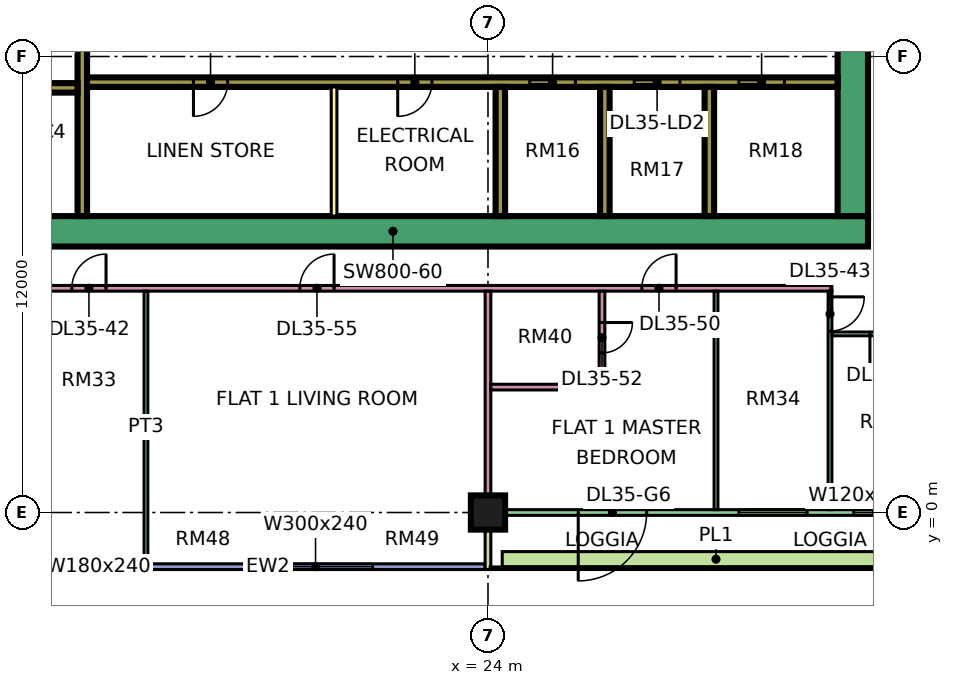
"""IFC4 building model, lengths in metres.
Left out: names, types, materials, properties, quantities, classifications, styles, units other than length and angle.
Written with IfcOpenShell. Run it as: python <this file> out.ifc"""

import sys

from ifc_helpers import new_model, si_unit, direction, frame, frame_2d, origin, origin_2d, place, context, subcontext, project, spatial, rectangle, extrude, element, fill, save


model = new_model("IFC4")
c1 = context("Model", 3, precision=1e-05, world=origin(), true_north=direction((0.0, 1.0)))
c2 = subcontext(c1, "Body", "Model", "MODEL_VIEW")
j1 = project(units=[si_unit("LENGTHUNIT", "METRE"), si_unit("PLANEANGLEUNIT", "RADIAN")], contexts=[c1])
p1 = place(None, origin())
s1 = spatial("IfcSite", under=j1, at=p1, CompositionType="ELEMENT")
p2 = place(p1, origin())
s2 = spatial("IfcBuilding", under=s1, at=p2, CompositionType="ELEMENT")
p3 = place(p2, frame((0.0, 0.0, 157.4)))
s3 = spatial("IfcBuildingStorey", under=s2, at=p3, CompositionType="ELEMENT", Elevation=157.4)
p4 = place(p3, frame((24.0, 0.0, 0.0), z_axis=(0.0, 0.0, 1.0), x_axis=(1.0, 0.0, 0.0)))
e1 = element("IfcColumn", 1, at=p4, inside=s3, PredefinedType="COLUMN", context=c2, shape_type="SweptSolid", body=[
    extrude(rectangle(XDim=0.9, YDim=0.9, at=origin_2d()), origin(), (0.0, 0.0, 1.0), 3.75),
])
p5 = place(p3, frame((9.0, 7.4, 0.0), z_axis=(0.0, 0.0, 1.0), x_axis=(1.0, 0.0, 0.0)))
e2 = element("IfcWall", 2, at=p5, inside=s3, PredefinedType="SHEAR", context=c2, shape_type="SweptSolid", body=[
    extrude(rectangle(XDim=25.0, YDim=0.8, at=frame_2d((12.5, 0.0))), origin(), (0.0, 0.0, 1.0), 3.75),
])
p6 = place(p3, frame((33.6, 7.8, 0.0), z_axis=(0.0, 0.0, 1.0), x_axis=(0.0, 1.0, 0.0)))
e3 = element("IfcWall", 3, at=p6, inside=s3, PredefinedType="SHEAR", context=c2, shape_type="SweptSolid", body=[
    extrude(rectangle(XDim=11.4, YDim=0.8, at=frame_2d((5.7, 0.0))), origin(), (0.0, 0.0, 1.0), 3.75),
])
p7 = place(p6, frame((5.4, 0.0, 0.0)))
e4 = element("IfcOpeningElement", 4, at=p7, cuts=e3, PredefinedType="OPENING", context=c2, shape_type="SweptSolid", body=[
    extrude(rectangle(XDim=1.8, YDim=2.4, at=frame_2d((0.9, 1.2))), frame((0.0, 0.41, 0.0), z_axis=(0.0, -1.0, 0.0), x_axis=(1.0, 0.0, 0.0)), (0.0, 0.0, 1.0), 0.82),
])
p8 = place(p3, frame((13.325, 7.8, 0.0), z_axis=(0.0, 0.0, 1.0), x_axis=(0.0, 1.0, 0.0)))
e5 = element("IfcWall", 5, at=p8, inside=s3, PredefinedType="SHEAR", context=c2, shape_type="SweptSolid", body=[
    extrude(rectangle(XDim=11.4, YDim=0.25, at=frame_2d((5.7, 0.0))), origin(), (0.0, 0.0, 1.0), 3.75),
])
p9 = place(p3, frame((13.45, 11.325, 0.0), z_axis=(0.0, 0.0, 1.0), x_axis=(1.0, 0.0, 0.0)))
e6 = element("IfcWall", 6, at=p9, inside=s3, PredefinedType="SHEAR", context=c2, shape_type="SweptSolid", body=[
    extrude(rectangle(XDim=19.75, YDim=0.25, at=frame_2d((9.875, 0.0))), origin(), (0.0, 0.0, 1.0), 3.75),
])
p10 = place(p9, frame((11.65, 0.0, 0.0)))
e7 = element("IfcOpeningElement", 7, at=p10, cuts=e6, PredefinedType="OPENING", context=c2, shape_type="SweptSolid", body=[
    extrude(rectangle(XDim=1.2, YDim=2.2, at=frame_2d((0.6, 1.1))), frame((0.0, 0.135, 0.0), z_axis=(0.0, -1.0, 0.0), x_axis=(1.0, 0.0, 0.0)), (0.0, 0.0, 1.0), 0.27),
])
p11 = place(p9, frame((14.4, 0.0, 0.0)))
e8 = element("IfcOpeningElement", 8, at=p11, cuts=e6, PredefinedType="OPENING", context=c2, shape_type="SweptSolid", body=[
    extrude(rectangle(XDim=1.2, YDim=2.2, at=frame_2d((0.6, 1.1))), frame((0.0, 0.135, 0.0), z_axis=(0.0, -1.0, 0.0), x_axis=(1.0, 0.0, 0.0)), (0.0, 0.0, 1.0), 0.27),
])
p12 = place(p9, frame((17.15, 0.0, 0.0)))
e9 = element("IfcOpeningElement", 9, at=p12, cuts=e6, PredefinedType="OPENING", context=c2, shape_type="SweptSolid", body=[
    extrude(rectangle(XDim=1.2, YDim=2.2, at=frame_2d((0.6, 1.1))), frame((0.0, 0.135, 0.0), z_axis=(0.0, -1.0, 0.0), x_axis=(1.0, 0.0, 0.0)), (0.0, 0.0, 1.0), 0.27),
])
p13 = place(p9, frame((2.8, 0.0, 0.0)))
e10 = element("IfcOpeningElement", 10, at=p13, cuts=e6, PredefinedType="OPENING", context=c2, shape_type="SweptSolid", body=[
    extrude(rectangle(XDim=0.9, YDim=2.1, at=frame_2d((0.45, 1.05))), frame((0.0, 0.135, 0.0), z_axis=(0.0, -1.0, 0.0), x_axis=(1.0, 0.0, 0.0)), (0.0, 0.0, 1.0), 0.27),
])
p14 = place(p9, frame((8.175, 0.0, 0.0)))
e11 = element("IfcOpeningElement", 11, at=p14, cuts=e6, PredefinedType="OPENING", context=c2, shape_type="SweptSolid", body=[
    extrude(rectangle(XDim=0.9, YDim=2.1, at=frame_2d((0.45, 1.05))), frame((0.0, 0.135, 0.0), z_axis=(0.0, -1.0, 0.0), x_axis=(1.0, 0.0, 0.0)), (0.0, 0.0, 1.0), 0.27),
])
p15 = place(p3, frame((10.2, 11.175, 0.0), z_axis=(0.0, 0.0, 1.0), x_axis=(1.0, 0.0, 0.0)))
e12 = element("IfcWall", 12, at=p15, inside=s3, PredefinedType="SHEAR", context=c2, shape_type="SweptSolid", body=[
    extrude(rectangle(XDim=3.0, YDim=0.25, at=frame_2d((1.5, 0.0))), origin(), (0.0, 0.0, 1.0), 3.75),
])
for number, where, z_axis, x_axis in (
    (13, (24.325, 7.8, 0.0), (0.0, 0.0, 1.0), (0.0, 1.0, 0.0)),
    (14, (27.075, 7.8, 0.0), (0.0, 0.0, 1.0), (0.0, 1.0, 0.0)),
    (15, (29.825, 7.8, 0.0), (0.0, 0.0, 1.0), (0.0, 1.0, 0.0)),
):
    element("IfcWall", number, at=place(p3, frame(where, z_axis=z_axis, x_axis=x_axis)), inside=s3, PredefinedType="SHEAR", context=c2, shape_type="SweptSolid", body=[
        extrude(rectangle(XDim=3.4, YDim=0.25, at=frame_2d((1.7, 0.0))), origin(), (0.0, 0.0, 1.0), 3.75),
    ])
p16 = place(p3, frame((-1.447, 12.553, 0.0), z_axis=(0.0, 0.0, 1.0), x_axis=(0.707106781187, -0.707106781187, 0.0)))
e16 = element("IfcWall", 16, at=p16, inside=s3, PredefinedType="SOLIDWALL", context=c2, shape_type="SweptSolid", body=[
    extrude(rectangle(XDim=19.799, YDim=0.15, at=frame_2d((9.899, 0.0))), origin(), (0.0, 0.0, 1.0), 3.35),
])
p17 = place(p16, frame((2.212, 0.0, 0.45)))
e17 = element("IfcOpeningElement", 17, at=p17, cuts=e16, PredefinedType="OPENING", context=c2, shape_type="SweptSolid", body=[
    extrude(rectangle(XDim=3.0, YDim=2.4, at=frame_2d((1.5, 1.2))), frame((0.0, 0.085, 0.0), z_axis=(0.0, -1.0, 0.0), x_axis=(1.0, 0.0, 0.0)), (0.0, 0.0, 1.0), 0.17),
])
p18 = place(p16, frame((10.216, 0.0, 0.45)))
e18 = element("IfcOpeningElement", 18, at=p18, cuts=e16, PredefinedType="OPENING", context=c2, shape_type="SweptSolid", body=[
    extrude(rectangle(XDim=3.0, YDim=2.4, at=frame_2d((1.5, 1.2))), frame((0.0, 0.085, 0.0), z_axis=(0.0, -1.0, 0.0), x_axis=(1.0, 0.0, 0.0)), (0.0, 0.0, 1.0), 0.17),
])
p19 = place(p3, frame((12.5, -1.425, 0.0), z_axis=(0.0, 0.0, 1.0), x_axis=(1.0, 0.0, 0.0)))
e19 = element("IfcWall", 19, at=p19, inside=s3, PredefinedType="SOLIDWALL", context=c2, shape_type="SweptSolid", body=[
    extrude(rectangle(XDim=11.425, YDim=0.15, at=frame_2d((5.712, 0.0))), origin(), (0.0, 0.0, 1.0), 3.35),
])
p20 = place(p19, frame((0.35, 0.0, 0.45)))
e20 = element("IfcOpeningElement", 20, at=p20, cuts=e19, PredefinedType="OPENING", context=c2, shape_type="SweptSolid", body=[
    extrude(rectangle(XDim=1.8, YDim=2.4, at=frame_2d((0.9, 1.2))), frame((0.0, 0.085, 0.0), z_axis=(0.0, -1.0, 0.0), x_axis=(1.0, 0.0, 0.0)), (0.0, 0.0, 1.0), 0.17),
])
p21 = place(p19, frame((5.462, 0.0, 0.45)))
e21 = element("IfcOpeningElement", 21, at=p21, cuts=e19, PredefinedType="OPENING", context=c2, shape_type="SweptSolid", body=[
    extrude(rectangle(XDim=3.0, YDim=2.4, at=frame_2d((1.5, 1.2))), frame((0.0, 0.085, 0.0), z_axis=(0.0, -1.0, 0.0), x_axis=(1.0, 0.0, 0.0)), (0.0, 0.0, 1.0), 0.17),
])
p22 = place(p3, frame((24.075, 0.0, 0.0), z_axis=(0.0, 0.0, 1.0), x_axis=(1.0, 0.0, 0.0)))
e22 = element("IfcWall", 22, at=p22, inside=s3, PredefinedType="SOLIDWALL", context=c2, shape_type="SweptSolid", body=[
    extrude(rectangle(XDim=11.85, YDim=0.15, at=frame_2d((5.925, 0.0))), origin(), (0.0, 0.0, 1.0), 3.35),
])
p23 = place(p22, frame((2.3, 0.0, 0.0)))
e23 = element("IfcOpeningElement", 23, at=p23, cuts=e22, PredefinedType="OPENING", context=c2, shape_type="SweptSolid", body=[
    extrude(rectangle(XDim=1.8, YDim=2.4, at=frame_2d((0.9, 1.2))), frame((0.0, 0.085, 0.0), z_axis=(0.0, -1.0, 0.0), x_axis=(1.0, 0.0, 0.0)), (0.0, 0.0, 1.0), 0.17),
])
p24 = place(p22, frame((6.525, 0.0, 0.45)))
e24 = element("IfcOpeningElement", 24, at=p24, cuts=e22, PredefinedType="OPENING", context=c2, shape_type="SweptSolid", body=[
    extrude(rectangle(XDim=1.8, YDim=2.4, at=frame_2d((0.9, 1.2))), frame((0.0, 0.085, 0.0), z_axis=(0.0, -1.0, 0.0), x_axis=(1.0, 0.0, 0.0)), (0.0, 0.0, 1.0), 0.17),
])
p25 = place(p22, frame((9.55, 0.0, 0.45)))
e25 = element("IfcOpeningElement", 25, at=p25, cuts=e22, PredefinedType="OPENING", context=c2, shape_type="SweptSolid", body=[
    extrude(rectangle(XDim=1.2, YDim=2.4, at=frame_2d((0.6, 1.2))), frame((0.0, 0.085, 0.0), z_axis=(0.0, -1.0, 0.0), x_axis=(1.0, 0.0, 0.0)), (0.0, 0.0, 1.0), 0.17),
])
p26 = place(p3, frame((24.0, -1.5, 0.0), z_axis=(0.0, 0.0, 1.0), x_axis=(0.0, 1.0, 0.0)))
e26 = element("IfcWall", 26, at=p26, inside=s3, PredefinedType="SOLIDWALL", context=c2, shape_type="SweptSolid", body=[
    extrude(rectangle(XDim=1.5, YDim=0.15, at=frame_2d((0.75, 0.0))), origin(), (0.0, 0.0, 1.0), 3.35),
])
p27 = place(p3, frame((24.375, -1.229, 0.0), z_axis=(0.0, 0.0, 1.0), x_axis=(1.0, 0.0, 0.0)))
e27 = element("IfcWall", 27, at=p27, inside=s3, PredefinedType="SOLIDWALL", context=c2, shape_type="SweptSolid", body=[
    extrude(rectangle(XDim=11.25, YDim=0.4, at=frame_2d((5.625, 0.0))), origin(), (0.0, 0.0, 1.0), 0.7),
])
p28 = place(p3, frame((19.95, 7.8, 0.0), z_axis=(0.0, 0.0, 1.0), x_axis=(0.0, 1.0, 0.0)))
e28 = element("IfcWall", 28, at=p28, inside=s3, PredefinedType="PARTITIONING", context=c2, shape_type="SweptSolid", body=[
    extrude(rectangle(XDim=3.4, YDim=0.15, at=frame_2d((1.7, 0.0))), origin(), (0.0, 0.0, 1.0), 3.35),
])
p29 = place(p3, frame((11.95, 5.9, 0.0), z_axis=(0.0, 0.0, 1.0), x_axis=(1.0, 0.0, 0.0)))
e29 = element("IfcWall", 29, at=p29, inside=s3, PredefinedType="PARTITIONING", context=c2, shape_type="SweptSolid", body=[
    extrude(rectangle(XDim=21.1, YDim=0.15, at=frame_2d((10.55, 0.0))), origin(), (0.0, 0.0, 1.0), 3.35),
])
p30 = place(p29, frame((1.1, 0.0, 0.0)))
e30 = element("IfcOpeningElement", 30, at=p30, cuts=e29, PredefinedType="OPENING", context=c2, shape_type="SweptSolid", body=[
    extrude(rectangle(XDim=0.9, YDim=2.1, at=frame_2d((0.45, 1.05))), frame((0.0, 0.085, 0.0), z_axis=(0.0, -1.0, 0.0), x_axis=(1.0, 0.0, 0.0)), (0.0, 0.0, 1.0), 0.17),
])
p31 = place(p29, frame((16.1, 0.0, 0.0)))
e31 = element("IfcOpeningElement", 31, at=p31, cuts=e29, PredefinedType="OPENING", context=c2, shape_type="SweptSolid", body=[
    extrude(rectangle(XDim=0.9, YDim=2.1, at=frame_2d((0.45, 1.05))), frame((0.0, 0.085, 0.0), z_axis=(0.0, -1.0, 0.0), x_axis=(1.0, 0.0, 0.0)), (0.0, 0.0, 1.0), 0.17),
])
p32 = place(p29, frame((7.1, 0.0, 0.0)))
e32 = element("IfcOpeningElement", 32, at=p32, cuts=e29, PredefinedType="OPENING", context=c2, shape_type="SweptSolid", body=[
    extrude(rectangle(XDim=0.9, YDim=2.1, at=frame_2d((0.45, 1.05))), frame((0.0, 0.085, 0.0), z_axis=(0.0, -1.0, 0.0), x_axis=(1.0, 0.0, 0.0)), (0.0, 0.0, 1.0), 0.17),
])
p33 = place(p3, frame((15.0, -1.35, 0.0), z_axis=(0.0, 0.0, 1.0), x_axis=(0.0, 1.0, 0.0)))
e33 = element("IfcWall", 33, at=p33, inside=s3, PredefinedType="PARTITIONING", context=c2, shape_type="SweptSolid", body=[
    extrude(rectangle(XDim=7.175, YDim=0.1, at=frame_2d((3.587, 0.0))), origin(), (0.0, 0.0, 1.0), 3.35),
])
p34 = place(p3, frame((24.0, 0.0, 0.0), z_axis=(0.0, 0.0, 1.0), x_axis=(0.0, 1.0, 0.0)))
e34 = element("IfcWall", 34, at=p34, inside=s3, PredefinedType="PARTITIONING", context=c2, shape_type="SweptSolid", body=[
    extrude(rectangle(XDim=5.825, YDim=0.15, at=frame_2d((2.913, 0.0))), origin(), (0.0, 0.0, 1.0), 3.35),
])
p35 = place(p3, frame((24.075, 3.3, 0.0), z_axis=(0.0, 0.0, 1.0), x_axis=(1.0, 0.0, 0.0)))
e35 = element("IfcWall", 35, at=p35, inside=s3, PredefinedType="PARTITIONING", context=c2, shape_type="SweptSolid", body=[
    extrude(rectangle(XDim=3.0, YDim=0.15, at=frame_2d((1.5, 0.0))), origin(), (0.0, 0.0, 1.0), 3.35),
])
p36 = place(p3, frame((27.0, 3.375, 0.0), z_axis=(0.0, 0.0, 1.0), x_axis=(0.0, 1.0, 0.0)))
e36 = element("IfcWall", 36, at=p36, inside=s3, PredefinedType="PARTITIONING", context=c2, shape_type="SweptSolid", body=[
    extrude(rectangle(XDim=2.45, YDim=0.15, at=frame_2d((1.225, 0.0))), origin(), (0.0, 0.0, 1.0), 3.35),
])
p37 = place(p36, frame((0.825, 0.0, 0.0)))
e37 = element("IfcOpeningElement", 37, at=p37, cuts=e36, PredefinedType="OPENING", context=c2, shape_type="SweptSolid", body=[
    extrude(rectangle(XDim=0.8, YDim=2.1, at=frame_2d((0.4, 1.05))), frame((0.0, 0.085, 0.0), z_axis=(0.0, -1.0, 0.0), x_axis=(1.0, 0.0, 0.0)), (0.0, 0.0, 1.0), 0.17),
])
p38 = place(p3, frame((30.0, 0.074, 0.0), z_axis=(0.0, 0.0, 1.0), x_axis=(0.0, 1.0, 0.0)))
e38 = element("IfcWall", 38, at=p38, inside=s3, PredefinedType="PARTITIONING", context=c2, shape_type="SweptSolid", body=[
    extrude(rectangle(XDim=5.751, YDim=0.1, at=frame_2d((2.875, 0.0))), origin(), (0.0, 0.0, 1.0), 3.35),
])
p39 = place(p3, frame((33.0, 0.074, 0.0), z_axis=(0.0, 0.0, 1.0), x_axis=(0.0, 1.0, 0.0)))
e39 = element("IfcWall", 39, at=p39, inside=s3, PredefinedType="PARTITIONING", context=c2, shape_type="SweptSolid", body=[
    extrude(rectangle(XDim=5.751, YDim=0.1, at=frame_2d((2.875, 0.0))), origin(), (0.0, 0.0, 1.0), 3.35),
])
p40 = place(p39, frame((4.701, 0.0, 0.0)))
e40 = element("IfcOpeningElement", 40, at=p40, cuts=e39, PredefinedType="OPENING", context=c2, shape_type="SweptSolid", body=[
    extrude(rectangle(XDim=0.9, YDim=2.1, at=frame_2d((0.45, 1.05))), frame((0.0, 0.06, 0.0), z_axis=(0.0, -1.0, 0.0), x_axis=(1.0, 0.0, 0.0)), (0.0, 0.0, 1.0), 0.12),
])
p41 = place(p3, frame((33.05, 4.7, 0.0), z_axis=(0.0, 0.0, 1.0), x_axis=(1.0, 0.0, 0.0)))
e41 = element("IfcWall", 41, at=p41, inside=s3, PredefinedType="PARTITIONING", context=c2, shape_type="SweptSolid", body=[
    extrude(rectangle(XDim=20.85, YDim=0.1, at=frame_2d((10.425, 0.0))), origin(), (0.0, 0.0, 1.0), 3.35),
])
p42 = place(p41, frame((1.0, 0.0, 0.0)))
e42 = element("IfcOpeningElement", 42, at=p42, cuts=e41, PredefinedType="OPENING", context=c2, shape_type="SweptSolid", body=[
    extrude(rectangle(XDim=0.9, YDim=2.1, at=frame_2d((0.45, 1.05))), frame((0.0, 0.06, 0.0), z_axis=(0.0, -1.0, 0.0), x_axis=(1.0, 0.0, 0.0)), (0.0, 0.0, 1.0), 0.12),
])
p43 = place(p41, frame((13.0, 0.0, 0.0)))
e43 = element("IfcOpeningElement", 43, at=p43, cuts=e41, PredefinedType="OPENING", context=c2, shape_type="SweptSolid", body=[
    extrude(rectangle(XDim=0.9, YDim=2.1, at=frame_2d((0.45, 1.05))), frame((0.0, 0.06, 0.0), z_axis=(0.0, -1.0, 0.0), x_axis=(1.0, 0.0, 0.0)), (0.0, 0.0, 1.0), 0.12),
])
p44 = place(p41, frame((16.0, 0.0, 0.0)))
e44 = element("IfcOpeningElement", 44, at=p44, cuts=e41, PredefinedType="OPENING", context=c2, shape_type="SweptSolid", body=[
    extrude(rectangle(XDim=0.9, YDim=2.1, at=frame_2d((0.45, 1.05))), frame((0.0, 0.06, 0.0), z_axis=(0.0, -1.0, 0.0), x_axis=(1.0, 0.0, 0.0)), (0.0, 0.0, 1.0), 0.12),
])
p45 = place(p41, frame((19.0, 0.0, 0.0)))
e45 = element("IfcOpeningElement", 45, at=p45, cuts=e41, PredefinedType="OPENING", context=c2, shape_type="SweptSolid", body=[
    extrude(rectangle(XDim=0.9, YDim=2.1, at=frame_2d((0.45, 1.05))), frame((0.0, 0.06, 0.0), z_axis=(0.0, -1.0, 0.0), x_axis=(1.0, 0.0, 0.0)), (0.0, 0.0, 1.0), 0.12),
])
p46 = place(p41, frame((7.0, 0.0, 0.0)))
e46 = element("IfcOpeningElement", 46, at=p46, cuts=e41, PredefinedType="OPENING", context=c2, shape_type="SweptSolid", body=[
    extrude(rectangle(XDim=0.9, YDim=2.1, at=frame_2d((0.45, 1.05))), frame((0.0, 0.06, 0.0), z_axis=(0.0, -1.0, 0.0), x_axis=(1.0, 0.0, 0.0)), (0.0, 0.0, 1.0), 0.12),
])
p47 = place(p20, origin())
e47 = element("IfcWindow", 47, at=p47, inside=s3, PartitioningType="SINGLE_PANEL", PredefinedType="WINDOW", context=c2, shape_type="SweptSolid", body=[
    extrude(rectangle(XDim=1.8, YDim=2.4, at=frame_2d((0.9, 1.2))), frame((0.0, 0.03, 0.0), z_axis=(0.0, -1.0, 0.0), x_axis=(1.0, 0.0, 0.0)), (0.0, 0.0, 1.0), 0.06),
])
fill(e20, e47)
p48 = place(p21, origin())
e48 = element("IfcWindow", 48, at=p48, inside=s3, PartitioningType="SINGLE_PANEL", PredefinedType="WINDOW", context=c2, shape_type="SweptSolid", body=[
    extrude(rectangle(XDim=3.0, YDim=2.4, at=frame_2d((1.5, 1.2))), frame((0.0, 0.03, 0.0), z_axis=(0.0, -1.0, 0.0), x_axis=(1.0, 0.0, 0.0)), (0.0, 0.0, 1.0), 0.06),
])
fill(e21, e48)
p49 = place(p23, frame((1.8, 0.0, 0.0), z_axis=(0.0, 0.0, 1.0), x_axis=(-1.0, 0.0, 0.0)))
e49 = element("IfcDoor", 49, at=p49, inside=s3, OperationType="DOUBLE_DOOR_SINGLE_SWING", PredefinedType="DOOR", context=c2, shape_type="SweptSolid", body=[
    extrude(rectangle(XDim=1.8, YDim=2.4, at=frame_2d((0.9, 1.2))), frame((0.0, 0.025, 0.0), z_axis=(0.0, -1.0, 0.0), x_axis=(1.0, 0.0, 0.0)), (0.0, 0.0, 1.0), 0.05),
])
fill(e23, e49)
p50 = place(p24, origin())
e50 = element("IfcWindow", 50, at=p50, inside=s3, PartitioningType="SINGLE_PANEL", PredefinedType="WINDOW", context=c2, shape_type="SweptSolid", body=[
    extrude(rectangle(XDim=1.8, YDim=2.4, at=frame_2d((0.9, 1.2))), frame((0.0, 0.03, 0.0), z_axis=(0.0, -1.0, 0.0), x_axis=(1.0, 0.0, 0.0)), (0.0, 0.0, 1.0), 0.06),
])
fill(e24, e50)
p51 = place(p25, origin())
e51 = element("IfcWindow", 51, at=p51, inside=s3, PartitioningType="SINGLE_PANEL", PredefinedType="WINDOW", context=c2, shape_type="SweptSolid", body=[
    extrude(rectangle(XDim=1.2, YDim=2.4, at=frame_2d((0.6, 1.2))), frame((0.0, 0.03, 0.0), z_axis=(0.0, -1.0, 0.0), x_axis=(1.0, 0.0, 0.0)), (0.0, 0.0, 1.0), 0.06),
])
fill(e25, e51)
p52 = place(p10, origin())
e52 = element("IfcDoor", 52, at=p52, inside=s3, OperationType="DOUBLE_DOOR_SLIDING", PredefinedType="DOOR", context=c2, shape_type="SweptSolid", body=[
    extrude(rectangle(XDim=1.2, YDim=2.2, at=frame_2d((0.6, 1.1))), frame((0.0, 0.025, 0.0), z_axis=(0.0, -1.0, 0.0), x_axis=(1.0, 0.0, 0.0)), (0.0, 0.0, 1.0), 0.05),
])
fill(e7, e52)
p53 = place(p11, origin())
e53 = element("IfcDoor", 53, at=p53, inside=s3, OperationType="DOUBLE_DOOR_SLIDING", PredefinedType="DOOR", context=c2, shape_type="SweptSolid", body=[
    extrude(rectangle(XDim=1.2, YDim=2.2, at=frame_2d((0.6, 1.1))), frame((0.0, 0.025, 0.0), z_axis=(0.0, -1.0, 0.0), x_axis=(1.0, 0.0, 0.0)), (0.0, 0.0, 1.0), 0.05),
])
fill(e8, e53)
p54 = place(p12, origin())
e54 = element("IfcDoor", 54, at=p54, inside=s3, OperationType="DOUBLE_DOOR_SLIDING", PredefinedType="DOOR", context=c2, shape_type="SweptSolid", body=[
    extrude(rectangle(XDim=1.2, YDim=2.2, at=frame_2d((0.6, 1.1))), frame((0.0, 0.025, 0.0), z_axis=(0.0, -1.0, 0.0), x_axis=(1.0, 0.0, 0.0)), (0.0, 0.0, 1.0), 0.05),
])
fill(e9, e54)
p55 = place(p13, frame((0.9, 0.0, 0.0), z_axis=(0.0, 0.0, 1.0), x_axis=(-1.0, 0.0, 0.0)))
e55 = element("IfcDoor", 55, at=p55, inside=s3, OperationType="SINGLE_SWING_LEFT", PredefinedType="DOOR", context=c2, shape_type="SweptSolid", body=[
    extrude(rectangle(XDim=0.9, YDim=2.1, at=frame_2d((0.45, 1.05))), frame((0.0, 0.025, 0.0), z_axis=(0.0, -1.0, 0.0), x_axis=(1.0, 0.0, 0.0)), (0.0, 0.0, 1.0), 0.05),
])
fill(e10, e55)
p56 = place(p14, frame((0.9, 0.0, 0.0), z_axis=(0.0, 0.0, 1.0), x_axis=(-1.0, 0.0, 0.0)))
e56 = element("IfcDoor", 56, at=p56, inside=s3, OperationType="SINGLE_SWING_LEFT", PredefinedType="DOOR", context=c2, shape_type="SweptSolid", body=[
    extrude(rectangle(XDim=0.9, YDim=2.1, at=frame_2d((0.45, 1.05))), frame((0.0, 0.025, 0.0), z_axis=(0.0, -1.0, 0.0), x_axis=(1.0, 0.0, 0.0)), (0.0, 0.0, 1.0), 0.05),
])
fill(e11, e56)
p57 = place(p30, frame((0.9, 0.0, 0.0), z_axis=(0.0, 0.0, 1.0), x_axis=(-1.0, 0.0, 0.0)))
e57 = element("IfcDoor", 57, at=p57, inside=s3, OperationType="SINGLE_SWING_RIGHT", PredefinedType="DOOR", context=c2, shape_type="SweptSolid", body=[
    extrude(rectangle(XDim=0.9, YDim=2.1, at=frame_2d((0.45, 1.05))), frame((0.0, 0.025, 0.0), z_axis=(0.0, -1.0, 0.0), x_axis=(1.0, 0.0, 0.0)), (0.0, 0.0, 1.0), 0.05),
])
fill(e30, e57)
p58 = place(p40, origin())
e58 = element("IfcDoor", 58, at=p58, inside=s3, OperationType="SINGLE_SWING_RIGHT", PredefinedType="DOOR", context=c2, shape_type="SweptSolid", body=[
    extrude(rectangle(XDim=0.9, YDim=2.1, at=frame_2d((0.45, 1.05))), frame((0.0, 0.025, 0.0), z_axis=(0.0, -1.0, 0.0), x_axis=(1.0, 0.0, 0.0)), (0.0, 0.0, 1.0), 0.05),
])
fill(e40, e58)
p59 = place(p42, frame((0.9, 0.0, 0.0), z_axis=(0.0, 0.0, 1.0), x_axis=(-1.0, 0.0, 0.0)))
e59 = element("IfcDoor", 59, at=p59, inside=s3, OperationType="SINGLE_SWING_LEFT", PredefinedType="DOOR", context=c2, shape_type="SweptSolid", body=[
    extrude(rectangle(XDim=0.9, YDim=2.1, at=frame_2d((0.45, 1.05))), frame((0.0, 0.025, 0.0), z_axis=(0.0, -1.0, 0.0), x_axis=(1.0, 0.0, 0.0)), (0.0, 0.0, 1.0), 0.05),
])
fill(e42, e59)
p60 = place(p31, frame((0.9, 0.0, 0.0), z_axis=(0.0, 0.0, 1.0), x_axis=(-1.0, 0.0, 0.0)))
e60 = element("IfcDoor", 60, at=p60, inside=s3, OperationType="SINGLE_SWING_RIGHT", PredefinedType="DOOR", context=c2, shape_type="SweptSolid", body=[
    extrude(rectangle(XDim=0.9, YDim=2.1, at=frame_2d((0.45, 1.05))), frame((0.0, 0.025, 0.0), z_axis=(0.0, -1.0, 0.0), x_axis=(1.0, 0.0, 0.0)), (0.0, 0.0, 1.0), 0.05),
])
fill(e31, e60)
p61 = place(p37, origin())
e61 = element("IfcDoor", 61, at=p61, inside=s3, OperationType="SINGLE_SWING_RIGHT", PredefinedType="DOOR", context=c2, shape_type="SweptSolid", body=[
    extrude(rectangle(XDim=0.8, YDim=2.1, at=frame_2d((0.4, 1.05))), frame((0.0, 0.025, 0.0), z_axis=(0.0, -1.0, 0.0), x_axis=(1.0, 0.0, 0.0)), (0.0, 0.0, 1.0), 0.05),
])
fill(e37, e61)
p62 = place(p32, frame((0.9, 0.0, 0.0), z_axis=(0.0, 0.0, 1.0), x_axis=(-1.0, 0.0, 0.0)))
e62 = element("IfcDoor", 62, at=p62, inside=s3, OperationType="SINGLE_SWING_RIGHT", PredefinedType="DOOR", context=c2, shape_type="SweptSolid", body=[
    extrude(rectangle(XDim=0.9, YDim=2.1, at=frame_2d((0.45, 1.05))), frame((0.0, 0.025, 0.0), z_axis=(0.0, -1.0, 0.0), x_axis=(1.0, 0.0, 0.0)), (0.0, 0.0, 1.0), 0.05),
])
fill(e32, e62)
save(model, sys.argv[1])
